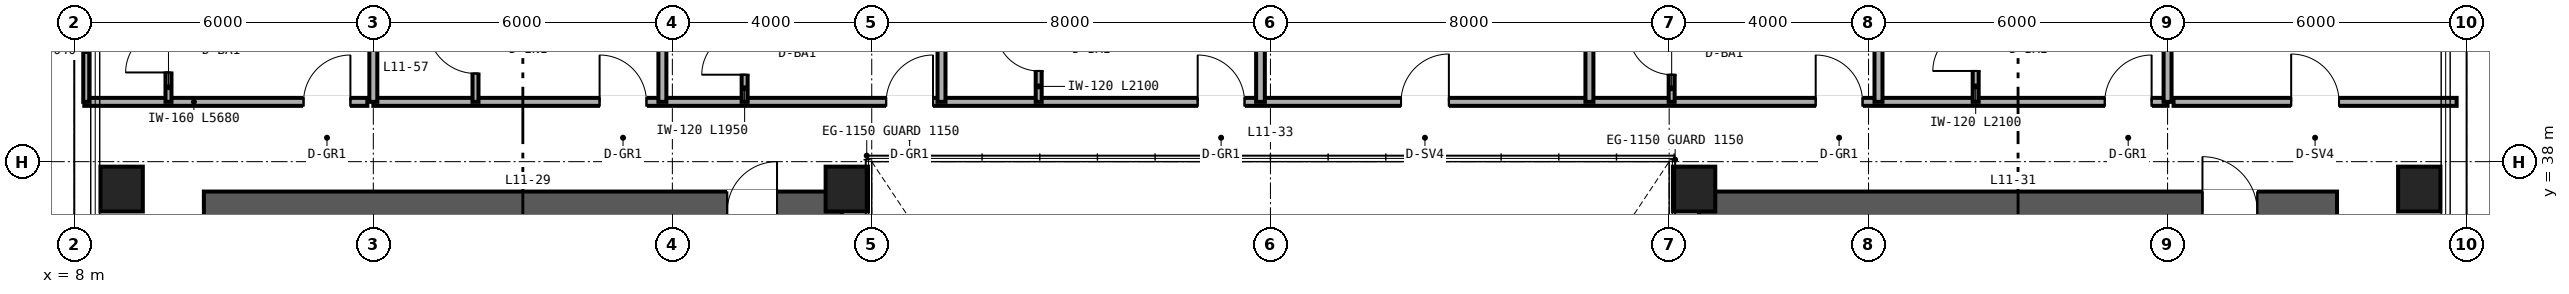
"""IFC4 building model, lengths in metres.
Left out: names, types, materials, properties, quantities, classifications, styles, units other than length and angle.
Written with IfcOpenShell. Run it as: python <this file> out.ifc"""

import sys

from ifc_helpers import new_model, si_unit, direction, frame, frame_2d, origin, origin_2d, place, context, subcontext, project, spatial, rectangle, hollow_rectangle, extrude, source, transform, mapped, element, fill, save


model = new_model("IFC4")
c1 = context("Model", 3, precision=1e-05, world=origin(), true_north=direction((0.0, 1.0)))
c2 = subcontext(c1, "Body", "Model", "MODEL_VIEW")
j1 = project(units=[si_unit("LENGTHUNIT", "METRE"), si_unit("PLANEANGLEUNIT", "RADIAN")], contexts=[c1])
p1 = place(None, origin())
s1 = spatial("IfcSite", under=j1, at=p1, CompositionType="ELEMENT")
p2 = place(p1, origin())
s2 = spatial("IfcBuilding", under=s1, at=p2, CompositionType="ELEMENT")
p3 = place(p2, frame((0.0, 0.0, 49.2)))
s3 = spatial("IfcBuildingStorey", under=s2, at=p3, CompositionType="ELEMENT", Elevation=49.2)
p4 = place(p3, frame((10.6, 37.0, 0.0), z_axis=(0.0, 0.0, 1.0), x_axis=(1.0, 0.0, 0.0)))
e1 = element("IfcWall", 1, at=p4, inside=s3, PredefinedType="SHEAR", context=c2, shape_type="SweptSolid", body=[
    extrude(rectangle(XDim=12.8, YDim=0.8, at=frame_2d((6.4, 0.0))), origin(), (0.0, 0.0, 1.0), 3.35),
])
p5 = place(p4, frame((10.5, 0.0, 0.0)))
e2 = element("IfcOpeningElement", 2, at=p5, cuts=e1, PredefinedType="OPENING", context=c2, shape_type="SweptSolid", body=[
    extrude(rectangle(XDim=1.0, YDim=2.15, at=frame_2d((0.5, 1.075))), frame((0.0, 0.41, 0.0), z_axis=(0.0, -1.0, 0.0), x_axis=(1.0, 0.0, 0.0)), (0.0, 0.0, 1.0), 0.82),
])
p6 = place(p3, frame((40.6, 37.0, 0.0), z_axis=(0.0, 0.0, 1.0), x_axis=(1.0, 0.0, 0.0)))
e3 = element("IfcWall", 3, at=p6, inside=s3, PredefinedType="SHEAR", context=c2, shape_type="SweptSolid", body=[
    extrude(rectangle(XDim=12.8, YDim=0.8, at=frame_2d((6.4, 0.0))), origin(), (0.0, 0.0, 1.0), 3.35),
])
p7 = place(p6, frame((10.1, 0.0, 0.0)))
e4 = element("IfcOpeningElement", 4, at=p7, cuts=e3, PredefinedType="OPENING", context=c2, shape_type="SweptSolid", body=[
    extrude(rectangle(XDim=1.1, YDim=2.15, at=frame_2d((0.55, 1.075))), frame((0.0, 0.41, 0.0), z_axis=(0.0, -1.0, 0.0), x_axis=(1.0, 0.0, 0.0)), (0.0, 0.0, 1.0), 0.82),
])
m1 = source(origin(), c2, "Body", "SweptSolid", [
    extrude(hollow_rectangle(XDim=0.85, YDim=0.9, WallThickness=0.04, at=origin_2d()), origin(), (0.0, 0.0, 1.0), 3.35),
])
for number, where, z_axis, x_axis in (
    (5, (8.95, 37.45, 0.0), (0.0, 0.0, 1.0), (1.0, 0.0, 0.0)),
    (6, (23.5, 37.45, 0.0), (0.0, 0.0, 1.0), (1.0, 0.0, 0.0)),
    (7, (40.5, 37.45, 0.0), (0.0, 0.0, 1.0), (1.0, 0.0, 0.0)),
    (8, (55.05, 37.45, 0.0), (0.0, 0.0, 1.0), (1.0, 0.0, 0.0)),
):
    element("IfcColumn", number, at=place(p3, frame(where, z_axis=z_axis, x_axis=x_axis)), inside=s3, PredefinedType="COLUMN", context=c2, shape_type="MappedRepresentation", body=[
        mapped(m1, transform((0.0, 0.0, 0.0), scale=1.0)),
    ])
p8 = place(p3, frame((8.2, 39.2, 0.0), z_axis=(0.0, 0.0, 1.0), x_axis=(1.0, 0.0, 0.0)))
e9 = element("IfcWall", 9, at=p8, inside=s3, PredefinedType="PARTITIONING", context=c2, shape_type="SweptSolid", body=[
    extrude(rectangle(XDim=5.68, YDim=0.16, at=frame_2d((2.84, 0.0))), origin(), (0.0, 0.0, 1.0), 3.35),
])
p9 = place(p8, frame((4.4, 0.0, 0.0)))
e10 = element("IfcOpeningElement", 10, at=p9, cuts=e9, PredefinedType="OPENING", context=c2, shape_type="SweptSolid", body=[
    extrude(rectangle(XDim=0.94, YDim=2.15, at=frame_2d((0.47, 1.075))), frame((0.0, 0.09, 0.0), z_axis=(0.0, -1.0, 0.0), x_axis=(1.0, 0.0, 0.0)), (0.0, 0.0, 1.0), 0.18),
])
p10 = place(p3, frame((9.89, 39.2, 0.0), z_axis=(0.0, 0.0, 1.0), x_axis=(0.0, 1.0, 0.0)))
e11 = element("IfcWall", 11, at=p10, inside=s3, PredefinedType="PARTITIONING", context=c2, shape_type="SweptSolid", body=[
    extrude(rectangle(XDim=2.04, YDim=0.12, at=frame_2d((1.02, 0.0))), origin(), (0.0, 0.0, 1.0), 3.35),
])
p11 = place(p10, frame((0.59, 0.0, 0.0)))
e12 = element("IfcOpeningElement", 12, at=p11, cuts=e11, PredefinedType="OPENING", context=c2, shape_type="SweptSolid", body=[
    extrude(rectangle(XDim=0.86, YDim=2.1, at=frame_2d((0.43, 1.05))), frame((0.0, 0.07, 0.0), z_axis=(0.0, -1.0, 0.0), x_axis=(1.0, 0.0, 0.0)), (0.0, 0.0, 1.0), 0.14),
])
p12 = place(p3, frame((8.24, 39.2, 0.0), z_axis=(0.0, 0.0, 1.0), x_axis=(0.0, 1.0, 0.0)))
e13 = element("IfcWall", 13, at=p12, inside=s3, PredefinedType="PARTITIONING", context=c2, shape_type="SweptSolid", body=[
    extrude(rectangle(XDim=2.04, YDim=0.12, at=frame_2d((1.02, 0.0))), origin(), (0.0, 0.0, 1.0), 3.35),
])
p13 = place(p3, frame((50.12, 39.2, 0.0), z_axis=(0.0, 0.0, 1.0), x_axis=(1.0, 0.0, 0.0)))
e14 = element("IfcWall", 14, at=p13, inside=s3, PredefinedType="PARTITIONING", context=c2, shape_type="SweptSolid", body=[
    extrude(rectangle(XDim=5.68, YDim=0.16, at=frame_2d((2.84, 0.0))), origin(), (0.0, 0.0, 1.0), 3.35),
])
p14 = place(p13, frame((2.36, 0.0, 0.0)))
e15 = element("IfcOpeningElement", 15, at=p14, cuts=e14, PredefinedType="OPENING", context=c2, shape_type="SweptSolid", body=[
    extrude(rectangle(XDim=0.96, YDim=2.15, at=frame_2d((0.48, 1.075))), frame((0.0, 0.09, 0.0), z_axis=(0.0, -1.0, 0.0), x_axis=(1.0, 0.0, 0.0)), (0.0, 0.0, 1.0), 0.18),
])
p15 = place(p3, frame((14.0, 39.2, 0.0), z_axis=(0.0, 0.0, 1.0), x_axis=(1.0, 0.0, 0.0)))
e16 = element("IfcWall", 16, at=p15, inside=s3, PredefinedType="PARTITIONING", context=c2, shape_type="SweptSolid", body=[
    extrude(rectangle(XDim=36.0, YDim=0.16, at=frame_2d((18.0, 0.0))), origin(), (0.0, 0.0, 1.0), 2.571),
])
p16 = place(p15, frame((4.54, 0.0, 0.0)))
e17 = element("IfcOpeningElement", 17, at=p16, cuts=e16, PredefinedType="OPENING", context=c2, shape_type="SweptSolid", body=[
    extrude(rectangle(XDim=0.94, YDim=2.15, at=frame_2d((0.47, 1.075))), frame((0.0, 0.09, 0.0), z_axis=(0.0, -1.0, 0.0), x_axis=(1.0, 0.0, 0.0)), (0.0, 0.0, 1.0), 0.18),
])
p17 = place(p15, frame((10.29, 0.0, 0.0)))
e18 = element("IfcOpeningElement", 18, at=p17, cuts=e16, PredefinedType="OPENING", context=c2, shape_type="SweptSolid", body=[
    extrude(rectangle(XDim=0.94, YDim=2.15, at=frame_2d((0.47, 1.075))), frame((0.0, 0.09, 0.0), z_axis=(0.0, -1.0, 0.0), x_axis=(1.0, 0.0, 0.0)), (0.0, 0.0, 1.0), 0.18),
])
p18 = place(p15, frame((16.54, 0.0, 0.0)))
e19 = element("IfcOpeningElement", 19, at=p18, cuts=e16, PredefinedType="OPENING", context=c2, shape_type="SweptSolid", body=[
    extrude(rectangle(XDim=0.94, YDim=2.15, at=frame_2d((0.47, 1.075))), frame((0.0, 0.09, 0.0), z_axis=(0.0, -1.0, 0.0), x_axis=(1.0, 0.0, 0.0)), (0.0, 0.0, 1.0), 0.18),
])
p19 = place(p15, frame((20.62, 0.0, 0.0)))
e20 = element("IfcOpeningElement", 20, at=p19, cuts=e16, PredefinedType="OPENING", context=c2, shape_type="SweptSolid", body=[
    extrude(rectangle(XDim=0.96, YDim=2.15, at=frame_2d((0.48, 1.075))), frame((0.0, 0.09, 0.0), z_axis=(0.0, -1.0, 0.0), x_axis=(1.0, 0.0, 0.0)), (0.0, 0.0, 1.0), 0.18),
])
p20 = place(p15, frame((28.94, 0.0, 0.0)))
e21 = element("IfcOpeningElement", 21, at=p20, cuts=e16, PredefinedType="OPENING", context=c2, shape_type="SweptSolid", body=[
    extrude(rectangle(XDim=0.94, YDim=2.15, at=frame_2d((0.47, 1.075))), frame((0.0, 0.09, 0.0), z_axis=(0.0, -1.0, 0.0), x_axis=(1.0, 0.0, 0.0)), (0.0, 0.0, 1.0), 0.18),
])
p21 = place(p15, frame((34.74, 0.0, 0.0)))
e22 = element("IfcOpeningElement", 22, at=p21, cuts=e16, PredefinedType="OPENING", context=c2, shape_type="SweptSolid", body=[
    extrude(rectangle(XDim=0.94, YDim=2.15, at=frame_2d((0.47, 1.075))), frame((0.0, 0.09, 0.0), z_axis=(0.0, -1.0, 0.0), x_axis=(1.0, 0.0, 0.0)), (0.0, 0.0, 1.0), 0.18),
])
for number, where, z_axis, x_axis in (
    (23, (14.0, 39.2, 0.0), (0.0, 0.0, 1.0), (0.0, 1.0, 0.0)),
    (24, (50.0, 39.2, 0.0), (0.0, 0.0, 1.0), (0.0, 1.0, 0.0)),
    (25, (19.8, 39.2, 0.0), (0.0, 0.0, 1.0), (0.0, 1.0, 0.0)),
):
    element("IfcWall", number, at=place(p3, frame(where, z_axis=z_axis, x_axis=x_axis)), inside=s3, PredefinedType="PARTITIONING", context=c2, shape_type="SweptSolid", body=[
        extrude(rectangle(XDim=10.44, YDim=0.16, at=frame_2d((5.22, 0.0))), origin(), (0.0, 0.0, 1.0), 2.657),
    ])
p22 = place(p3, frame((16.05, 39.2, 0.0), z_axis=(0.0, 0.0, 1.0), x_axis=(0.0, 1.0, 0.0)))
e26 = element("IfcWall", 26, at=p22, inside=s3, PredefinedType="PARTITIONING", context=c2, shape_type="SweptSolid", body=[
    extrude(rectangle(XDim=2.1, YDim=0.12, at=frame_2d((1.05, 0.0))), origin(), (0.0, 0.0, 1.0), 3.35),
])
p23 = place(p22, frame((0.57, 0.0, 0.0)))
e27 = element("IfcOpeningElement", 27, at=p23, cuts=e26, PredefinedType="OPENING", context=c2, shape_type="SweptSolid", body=[
    extrude(rectangle(XDim=0.96, YDim=2.15, at=frame_2d((0.48, 1.075))), frame((0.0, 0.07, 0.0), z_axis=(0.0, -1.0, 0.0), x_axis=(1.0, 0.0, 0.0)), (0.0, 0.0, 1.0), 0.14),
])
p24 = place(p3, frame((25.4, 39.2, 0.0), z_axis=(0.0, 0.0, 1.0), x_axis=(0.0, 1.0, 0.0)))
e28 = element("IfcWall", 28, at=p24, inside=s3, PredefinedType="PARTITIONING", context=c2, shape_type="SweptSolid", body=[
    extrude(rectangle(XDim=10.44, YDim=0.16, at=frame_2d((5.22, 0.0))), origin(), (0.0, 0.0, 1.0), 2.423),
])
p25 = place(p3, frame((21.45, 39.2, 0.0), z_axis=(0.0, 0.0, 1.0), x_axis=(0.0, 1.0, 0.0)))
e29 = element("IfcWall", 29, at=p25, inside=s3, PredefinedType="PARTITIONING", context=c2, shape_type="SweptSolid", body=[
    extrude(rectangle(XDim=1.95, YDim=0.12, at=frame_2d((0.975, 0.0))), origin(), (0.0, 0.0, 1.0), 3.35),
])
p26 = place(p25, frame((0.545, 0.0, 0.0)))
e30 = element("IfcOpeningElement", 30, at=p26, cuts=e29, PredefinedType="OPENING", context=c2, shape_type="SweptSolid", body=[
    extrude(rectangle(XDim=0.86, YDim=2.1, at=frame_2d((0.43, 1.05))), frame((0.0, 0.07, 0.0), z_axis=(0.0, -1.0, 0.0), x_axis=(1.0, 0.0, 0.0)), (0.0, 0.0, 1.0), 0.14),
])
p27 = place(p3, frame((31.8, 39.2, 0.0), z_axis=(0.0, 0.0, 1.0), x_axis=(0.0, 1.0, 0.0)))
e31 = element("IfcWall", 31, at=p27, inside=s3, PredefinedType="PARTITIONING", context=c2, shape_type="SweptSolid", body=[
    extrude(rectangle(XDim=10.44, YDim=0.175, at=frame_2d((5.22, 0.0))), origin(), (0.0, 0.0, 1.0), 2.423),
])
p28 = place(p3, frame((27.35, 39.2, 0.0), z_axis=(0.0, 0.0, 1.0), x_axis=(0.0, 1.0, 0.0)))
e32 = element("IfcWall", 32, at=p28, inside=s3, PredefinedType="PARTITIONING", context=c2, shape_type="SweptSolid", body=[
    extrude(rectangle(XDim=2.1, YDim=0.12, at=frame_2d((1.05, 0.0))), origin(), (0.0, 0.0, 1.0), 3.35),
])
p29 = place(p28, frame((0.62, 0.0, 0.0)))
e33 = element("IfcOpeningElement", 33, at=p29, cuts=e32, PredefinedType="OPENING", context=c2, shape_type="SweptSolid", body=[
    extrude(rectangle(XDim=0.86, YDim=2.1, at=frame_2d((0.43, 1.05))), frame((0.0, 0.07, 0.0), z_axis=(0.0, -1.0, 0.0), x_axis=(1.0, 0.0, 0.0)), (0.0, 0.0, 1.0), 0.14),
])
p30 = place(p3, frame((38.4, 39.2, 0.0), z_axis=(0.0, 0.0, 1.0), x_axis=(0.0, 1.0, 0.0)))
e34 = element("IfcWall", 34, at=p30, inside=s3, PredefinedType="PARTITIONING", context=c2, shape_type="SweptSolid", body=[
    extrude(rectangle(XDim=10.44, YDim=0.16, at=frame_2d((5.22, 0.0))), origin(), (0.0, 0.0, 1.0), 2.423),
])
p31 = place(p3, frame((44.2, 39.2, 0.0), z_axis=(0.0, 0.0, 1.0), x_axis=(0.0, 1.0, 0.0)))
e35 = element("IfcWall", 35, at=p31, inside=s3, PredefinedType="PARTITIONING", context=c2, shape_type="SweptSolid", body=[
    extrude(rectangle(XDim=10.44, YDim=0.16, at=frame_2d((5.22, 0.0))), origin(), (0.0, 0.0, 1.0), 2.657),
])
p32 = place(p3, frame((40.05, 39.2, 0.0), z_axis=(0.0, 0.0, 1.0), x_axis=(0.0, 1.0, 0.0)))
e36 = element("IfcWall", 36, at=p32, inside=s3, PredefinedType="PARTITIONING", context=c2, shape_type="SweptSolid", body=[
    extrude(rectangle(XDim=1.95, YDim=0.12, at=frame_2d((0.975, 0.0))), origin(), (0.0, 0.0, 1.0), 3.35),
])
p33 = place(p32, frame((0.545, 0.0, 0.0)))
e37 = element("IfcOpeningElement", 37, at=p33, cuts=e36, PredefinedType="OPENING", context=c2, shape_type="SweptSolid", body=[
    extrude(rectangle(XDim=0.86, YDim=2.1, at=frame_2d((0.43, 1.05))), frame((0.0, 0.07, 0.0), z_axis=(0.0, -1.0, 0.0), x_axis=(1.0, 0.0, 0.0)), (0.0, 0.0, 1.0), 0.14),
])
p34 = place(p3, frame((46.15, 39.2, 0.0), z_axis=(0.0, 0.0, 1.0), x_axis=(0.0, 1.0, 0.0)))
e38 = element("IfcWall", 38, at=p34, inside=s3, PredefinedType="PARTITIONING", context=c2, shape_type="SweptSolid", body=[
    extrude(rectangle(XDim=2.1, YDim=0.12, at=frame_2d((1.05, 0.0))), origin(), (0.0, 0.0, 1.0), 3.35),
])
p35 = place(p34, frame((0.62, 0.0, 0.0)))
e39 = element("IfcOpeningElement", 39, at=p35, cuts=e38, PredefinedType="OPENING", context=c2, shape_type="SweptSolid", body=[
    extrude(rectangle(XDim=0.86, YDim=2.1, at=frame_2d((0.43, 1.05))), frame((0.0, 0.07, 0.0), z_axis=(0.0, -1.0, 0.0), x_axis=(1.0, 0.0, 0.0)), (0.0, 0.0, 1.0), 0.14),
])
m2 = source(origin(), c2, "Body", "SweptSolid", [
    extrude(rectangle(XDim=1.0, YDim=2.15, at=frame_2d((0.5, 1.075))), frame((0.0, 0.025, 0.0), z_axis=(0.0, -1.0, 0.0), x_axis=(1.0, 0.0, 0.0)), (0.0, 0.0, 1.0), 0.05),
])
p36 = place(p5, origin())
e40 = element("IfcDoor", 40, at=p36, inside=s3, OperationType="SINGLE_SWING_RIGHT", PredefinedType="DOOR", context=c2, shape_type="MappedRepresentation", body=[
    mapped(m2, transform((0.0, 0.0, 0.0), scale=1.0)),
])
fill(e2, e40)
m3 = source(origin(), c2, "Body", "SweptSolid", [
    extrude(rectangle(XDim=1.1, YDim=2.15, at=frame_2d((0.55, 1.075))), frame((0.0, 0.025, 0.0), z_axis=(0.0, -1.0, 0.0), x_axis=(1.0, 0.0, 0.0)), (0.0, 0.0, 1.0), 0.05),
])
p37 = place(p7, origin())
e41 = element("IfcDoor", 41, at=p37, inside=s3, OperationType="SINGLE_SWING_LEFT", PredefinedType="DOOR", context=c2, shape_type="MappedRepresentation", body=[
    mapped(m3, transform((0.0, 0.0, 0.0), scale=1.0)),
])
fill(e4, e41)
m4 = source(origin(), c2, "Body", "SweptSolid", [
    extrude(rectangle(XDim=0.86, YDim=2.1, at=frame_2d((0.43, 1.05))), frame((0.0, 0.025, 0.0), z_axis=(0.0, -1.0, 0.0), x_axis=(1.0, 0.0, 0.0)), (0.0, 0.0, 1.0), 0.05),
])
p38 = place(p11, origin())
e42 = element("IfcDoor", 42, at=p38, inside=s3, OperationType="SINGLE_SWING_LEFT", PredefinedType="DOOR", context=c2, shape_type="MappedRepresentation", body=[
    mapped(m4, transform((0.0, 0.0, 0.0), scale=1.0)),
])
fill(e12, e42)
m5 = source(origin(), c2, "Body", "SweptSolid", [
    extrude(rectangle(XDim=0.94, YDim=2.15, at=frame_2d((0.47, 1.075))), frame((0.0, 0.025, 0.0), z_axis=(0.0, -1.0, 0.0), x_axis=(1.0, 0.0, 0.0)), (0.0, 0.0, 1.0), 0.05),
])
p39 = place(p9, origin())
e43 = element("IfcDoor", 43, at=p39, inside=s3, OperationType="SINGLE_SWING_RIGHT", PredefinedType="DOOR", context=c2, shape_type="MappedRepresentation", body=[
    mapped(m5, transform((0.0, 0.0, 0.0), scale=1.0)),
])
fill(e10, e43)
m6 = source(origin(), c2, "Body", "SweptSolid", [
    extrude(rectangle(XDim=0.96, YDim=2.15, at=frame_2d((0.48, 1.075))), frame((0.0, 0.025, 0.0), z_axis=(0.0, -1.0, 0.0), x_axis=(1.0, 0.0, 0.0)), (0.0, 0.0, 1.0), 0.05),
])
p40 = place(p14, origin())
e44 = element("IfcDoor", 44, at=p40, inside=s3, OperationType="SINGLE_SWING_LEFT", PredefinedType="DOOR", context=c2, shape_type="MappedRepresentation", body=[
    mapped(m6, transform((0.0, 0.0, 0.0), scale=1.0)),
])
fill(e15, e44)
p41 = place(p23, origin())
e45 = element("IfcDoor", 45, at=p41, inside=s3, OperationType="SINGLE_SWING_RIGHT", PredefinedType="DOOR", context=c2, shape_type="MappedRepresentation", body=[
    mapped(m6, transform((0.0, 0.0, 0.0), scale=1.0)),
])
fill(e27, e45)
p42 = place(p26, origin())
e46 = element("IfcDoor", 46, at=p42, inside=s3, OperationType="SINGLE_SWING_LEFT", PredefinedType="DOOR", context=c2, shape_type="MappedRepresentation", body=[
    mapped(m4, transform((0.0, 0.0, 0.0), scale=1.0)),
])
fill(e30, e46)
p43 = place(p29, origin())
e47 = element("IfcDoor", 47, at=p43, inside=s3, OperationType="SINGLE_SWING_RIGHT", PredefinedType="DOOR", context=c2, shape_type="MappedRepresentation", body=[
    mapped(m4, transform((0.0, 0.0, 0.0), scale=1.0)),
])
fill(e33, e47)
p44 = place(p33, origin())
e48 = element("IfcDoor", 48, at=p44, inside=s3, OperationType="SINGLE_SWING_RIGHT", PredefinedType="DOOR", context=c2, shape_type="MappedRepresentation", body=[
    mapped(m4, transform((0.0, 0.0, 0.0), scale=1.0)),
])
fill(e37, e48)
p45 = place(p35, origin())
e49 = element("IfcDoor", 49, at=p45, inside=s3, OperationType="SINGLE_SWING_LEFT", PredefinedType="DOOR", context=c2, shape_type="MappedRepresentation", body=[
    mapped(m4, transform((0.0, 0.0, 0.0), scale=1.0)),
])
fill(e39, e49)
p46 = place(p16, origin())
e50 = element("IfcDoor", 50, at=p46, inside=s3, OperationType="SINGLE_SWING_LEFT", PredefinedType="DOOR", context=c2, shape_type="MappedRepresentation", body=[
    mapped(m5, transform((0.0, 0.0, 0.0), scale=1.0)),
])
fill(e17, e50)
p47 = place(p17, origin())
e51 = element("IfcDoor", 51, at=p47, inside=s3, OperationType="SINGLE_SWING_RIGHT", PredefinedType="DOOR", context=c2, shape_type="MappedRepresentation", body=[
    mapped(m5, transform((0.0, 0.0, 0.0), scale=1.0)),
])
fill(e18, e51)
p48 = place(p18, origin())
e52 = element("IfcDoor", 52, at=p48, inside=s3, OperationType="SINGLE_SWING_LEFT", PredefinedType="DOOR", context=c2, shape_type="MappedRepresentation", body=[
    mapped(m5, transform((0.0, 0.0, 0.0), scale=1.0)),
])
fill(e19, e52)
p49 = place(p19, origin())
e53 = element("IfcDoor", 53, at=p49, inside=s3, OperationType="SINGLE_SWING_RIGHT", PredefinedType="DOOR", context=c2, shape_type="MappedRepresentation", body=[
    mapped(m6, transform((0.0, 0.0, 0.0), scale=1.0)),
])
fill(e20, e53)
p50 = place(p20, origin())
e54 = element("IfcDoor", 54, at=p50, inside=s3, OperationType="SINGLE_SWING_LEFT", PredefinedType="DOOR", context=c2, shape_type="MappedRepresentation", body=[
    mapped(m5, transform((0.0, 0.0, 0.0), scale=1.0)),
])
fill(e21, e54)
p51 = place(p21, origin())
e55 = element("IfcDoor", 55, at=p51, inside=s3, OperationType="SINGLE_SWING_RIGHT", PredefinedType="DOOR", context=c2, shape_type="MappedRepresentation", body=[
    mapped(m5, transform((0.0, 0.0, 0.0), scale=1.0)),
])
fill(e22, e55)
save(model, sys.argv[1])
